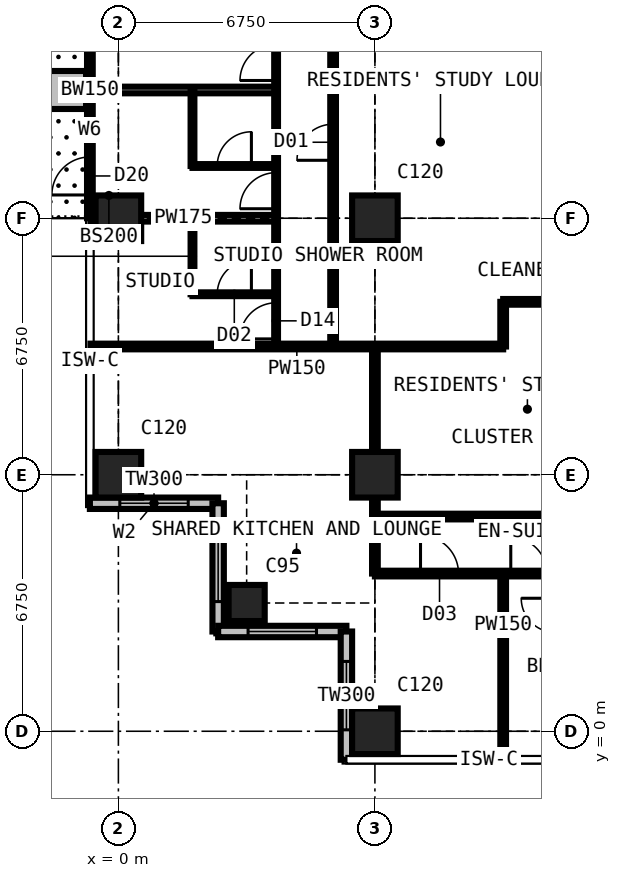
"""IFC4 building model, lengths in metres.
Left out: names, types, materials, properties, quantities, classifications, styles, units other than length and angle.
Written with IfcOpenShell. Run it as: python <this file> out.ifc"""

import sys

from ifc_helpers import new_model, si_unit, direction, frame, frame_2d, origin, origin_2d, place, context, subcontext, project, spatial, rectangle, extrude, element, fill, save


model = new_model("IFC4")
c1 = context("Model", 3, precision=1e-05, world=origin(), true_north=direction((0.0, 1.0)))
c2 = subcontext(c1, "Body", "Model", "MODEL_VIEW")
j1 = project(units=[si_unit("LENGTHUNIT", "METRE"), si_unit("PLANEANGLEUNIT", "RADIAN")], contexts=[c1])
p1 = place(None, origin())
s1 = spatial("IfcSite", under=j1, at=p1, CompositionType="ELEMENT")
p2 = place(p1, origin())
s2 = spatial("IfcBuilding", under=s1, at=p2, CompositionType="ELEMENT")
p3 = place(p2, frame((0.0, 0.0, 185.4)))
s3 = spatial("IfcBuildingStorey", under=s2, at=p3, CompositionType="ELEMENT", Elevation=185.4)
for number, where, z_axis, x_axis in (
    (1, (0.0, 6.75, 0.0), (0.0, 0.0, 1.0), (1.0, 0.0, 0.0)),
    (2, (0.0, 13.5, 0.0), (0.0, 0.0, 1.0), (1.0, 0.0, 0.0)),
):
    element("IfcColumn", number, at=place(p3, frame(where, z_axis=z_axis, x_axis=x_axis)), inside=s3, PredefinedType="COLUMN", context=c2, shape_type="SweptSolid", body=[
        extrude(rectangle(XDim=1.2, YDim=1.2, at=origin_2d()), origin(), (0.0, 0.0, 1.0), 3.6),
    ])
p4 = place(p3, frame((3.375, 3.375, 0.0), z_axis=(0.0, 0.0, 1.0), x_axis=(1.0, 0.0, 0.0)))
e3 = element("IfcColumn", 3, at=p4, inside=s3, PredefinedType="COLUMN", context=c2, shape_type="SweptSolid", body=[
    extrude(rectangle(XDim=0.95, YDim=0.95, at=origin_2d()), origin(), (0.0, 0.0, 1.0), 3.6),
])
for number, where, z_axis, x_axis in (
    (4, (6.75, 0.0, 0.0), (0.0, 0.0, 1.0), (1.0, 0.0, 0.0)),
    (5, (6.75, 6.75, 0.0), (0.0, 0.0, 1.0), (1.0, 0.0, 0.0)),
    (6, (6.75, 13.5, 0.0), (0.0, 0.0, 1.0), (1.0, 0.0, 0.0)),
):
    element("IfcColumn", number, at=place(p3, frame(where, z_axis=z_axis, x_axis=x_axis)), inside=s3, PredefinedType="COLUMN", context=c2, shape_type="SweptSolid", body=[
        extrude(rectangle(XDim=1.2, YDim=1.2, at=origin_2d()), origin(), (0.0, 0.0, 1.0), 3.6),
    ])
p5 = place(p3, frame((-0.75, 13.5, 0.0), z_axis=(0.0, 0.0, 1.0), x_axis=(0.0, 1.0, 0.0)))
e7 = element("IfcWall", 7, at=p5, inside=s3, PredefinedType="SOLIDWALL", context=c2, shape_type="SweptSolid", body=[
    extrude(rectangle(XDim=6.75, YDim=0.15, at=frame_2d((3.375, 0.0))), origin(), (0.0, 0.0, 1.0), 3.375),
])
p6 = place(p5, frame((0.613, 0.0, 0.0)))
e8 = element("IfcOpeningElement", 8, at=p6, cuts=e7, PredefinedType="OPENING", context=c2, shape_type="SweptSolid", body=[
    extrude(rectangle(XDim=1.0, YDim=2.2, at=frame_2d((0.5, 1.1))), frame((0.0, 0.085, 0.0), z_axis=(0.0, -1.0, 0.0), x_axis=(1.0, 0.0, 0.0)), (0.0, 0.0, 1.0), 0.17),
])
p7 = place(p5, frame((1.725, 0.0, 0.9)))
e9 = element("IfcOpeningElement", 9, at=p7, cuts=e7, PredefinedType="OPENING", context=c2, shape_type="SweptSolid", body=[
    extrude(rectangle(XDim=1.2, YDim=1.8, at=frame_2d((0.6, 0.9))), frame((0.0, 0.085, 0.0), z_axis=(0.0, -1.0, 0.0), x_axis=(1.0, 0.0, 0.0)), (0.0, 0.0, 1.0), 0.17),
])
p8 = place(p5, frame((5.137, 0.0, 0.0)))
e10 = element("IfcOpeningElement", 10, at=p8, cuts=e7, PredefinedType="OPENING", context=c2, shape_type="SweptSolid", body=[
    extrude(rectangle(XDim=1.0, YDim=2.2, at=frame_2d((0.5, 1.1))), frame((0.0, 0.085, 0.0), z_axis=(0.0, -1.0, 0.0), x_axis=(1.0, 0.0, 0.0)), (0.0, 0.0, 1.0), 0.17),
])
p9 = place(p5, frame((3.825, 0.0, 0.9)))
e11 = element("IfcOpeningElement", 11, at=p9, cuts=e7, PredefinedType="OPENING", context=c2, shape_type="SweptSolid", body=[
    extrude(rectangle(XDim=1.2, YDim=1.8, at=frame_2d((0.6, 0.9))), frame((0.0, 0.085, 0.0), z_axis=(0.0, -1.0, 0.0), x_axis=(1.0, 0.0, 0.0)), (0.0, 0.0, 1.0), 0.17),
])
p10 = place(p3, frame((-0.75, 6.0, 0.0), z_axis=(0.0, 0.0, 1.0), x_axis=(1.0, 0.0, 0.0)))
e12 = element("IfcWall", 12, at=p10, inside=s3, PredefinedType="SOLIDWALL", context=c2, shape_type="SweptSolid", body=[
    extrude(rectangle(XDim=3.375, YDim=0.3, at=frame_2d((1.688, 0.0))), origin(), (0.0, 0.0, 1.0), 3.375),
])
p11 = place(p10, frame((0.788, 0.0, 0.6)))
e13 = element("IfcOpeningElement", 13, at=p11, cuts=e12, PredefinedType="OPENING", context=c2, shape_type="SweptSolid", body=[
    extrude(rectangle(XDim=1.8, YDim=2.1, at=frame_2d((0.9, 1.05))), frame((0.0, 0.16, 0.0), z_axis=(0.0, -1.0, 0.0), x_axis=(1.0, 0.0, 0.0)), (0.0, 0.0, 1.0), 0.32),
])
p12 = place(p3, frame((2.625, 6.0, 0.0), z_axis=(0.0, 0.0, 1.0), x_axis=(0.0, -1.0, 0.0)))
e14 = element("IfcWall", 14, at=p12, inside=s3, PredefinedType="SOLIDWALL", context=c2, shape_type="SweptSolid", body=[
    extrude(rectangle(XDim=3.375, YDim=0.3, at=frame_2d((1.688, 0.0))), origin(), (0.0, 0.0, 1.0), 3.375),
])
p13 = place(p12, frame((0.788, 0.0, 0.6)))
e15 = element("IfcOpeningElement", 15, at=p13, cuts=e14, PredefinedType="OPENING", context=c2, shape_type="SweptSolid", body=[
    extrude(rectangle(XDim=1.8, YDim=2.1, at=frame_2d((0.9, 1.05))), frame((0.0, 0.16, 0.0), z_axis=(0.0, -1.0, 0.0), x_axis=(1.0, 0.0, 0.0)), (0.0, 0.0, 1.0), 0.32),
])
p14 = place(p3, frame((2.625, 2.625, 0.0), z_axis=(0.0, 0.0, 1.0), x_axis=(1.0, 0.0, 0.0)))
e16 = element("IfcWall", 16, at=p14, inside=s3, PredefinedType="SOLIDWALL", context=c2, shape_type="SweptSolid", body=[
    extrude(rectangle(XDim=3.375, YDim=0.3, at=frame_2d((1.688, 0.0))), origin(), (0.0, 0.0, 1.0), 3.375),
])
p15 = place(p14, frame((0.788, 0.0, 0.6)))
e17 = element("IfcOpeningElement", 17, at=p15, cuts=e16, PredefinedType="OPENING", context=c2, shape_type="SweptSolid", body=[
    extrude(rectangle(XDim=1.8, YDim=2.1, at=frame_2d((0.9, 1.05))), frame((0.0, 0.16, 0.0), z_axis=(0.0, -1.0, 0.0), x_axis=(1.0, 0.0, 0.0)), (0.0, 0.0, 1.0), 0.32),
])
p16 = place(p3, frame((6.0, 2.625, 0.0), z_axis=(0.0, 0.0, 1.0), x_axis=(0.0, -1.0, 0.0)))
e18 = element("IfcWall", 18, at=p16, inside=s3, PredefinedType="SOLIDWALL", context=c2, shape_type="SweptSolid", body=[
    extrude(rectangle(XDim=3.375, YDim=0.3, at=frame_2d((1.688, 0.0))), origin(), (0.0, 0.0, 1.0), 3.375),
])
p17 = place(p16, frame((0.788, 0.0, 0.6)))
e19 = element("IfcOpeningElement", 19, at=p17, cuts=e18, PredefinedType="OPENING", context=c2, shape_type="SweptSolid", body=[
    extrude(rectangle(XDim=1.8, YDim=2.1, at=frame_2d((0.9, 1.05))), frame((0.0, 0.16, 0.0), z_axis=(0.0, -1.0, 0.0), x_axis=(1.0, 0.0, 0.0)), (0.0, 0.0, 1.0), 0.32),
])
p18 = place(p3, frame((-0.85, 16.875, 0.0), z_axis=(0.0, 0.0, 1.0), x_axis=(-1.0, 0.0, 0.0)))
e20 = element("IfcWall", 20, at=p18, inside=s3, PredefinedType="USERDEFINED", context=c2, shape_type="SweptSolid", body=[
    extrude(rectangle(XDim=2.2, YDim=1.0, at=frame_2d((1.1, 0.0))), origin(), (0.0, 0.0, 1.0), 0.9),
])
p19 = place(p3, frame((-0.734, 10.125, 0.0), z_axis=(0.0, 0.0, 1.0), x_axis=(1.0, 0.0, 0.0)))
e21 = element("IfcWall", 21, at=p19, inside=s3, PredefinedType="PARTITIONING", context=c2, shape_type="SweptSolid", body=[
    extrude(rectangle(XDim=10.859, YDim=0.15, at=frame_2d((5.429, 0.0))), origin(), (0.0, 0.0, 1.0), 3.375),
])
p20 = place(p3, frame((-0.734, 13.5, 0.0), z_axis=(0.0, 0.0, 1.0), x_axis=(1.0, 0.0, 0.0)))
e22 = element("IfcWall", 22, at=p20, inside=s3, PredefinedType="PARTITIONING", context=c2, shape_type="SweptSolid", body=[
    extrude(rectangle(XDim=4.884, YDim=0.175, at=frame_2d((2.442, 0.0))), origin(), (0.0, 0.0, 1.0), 2.877),
])
p21 = place(p3, frame((-0.734, 16.875, 0.0), z_axis=(0.0, 0.0, 1.0), x_axis=(1.0, 0.0, 0.0)))
e23 = element("IfcWall", 23, at=p21, inside=s3, PredefinedType="PARTITIONING", context=c2, shape_type="SweptSolid", body=[
    extrude(rectangle(XDim=4.884, YDim=0.175, at=frame_2d((2.442, 0.0))), origin(), (0.0, 0.0, 1.0), 3.375),
])
p22 = place(p3, frame((1.95, 11.5, 0.0), z_axis=(0.0, 0.0, 1.0), x_axis=(0.0, 1.0, 0.0)))
e24 = element("IfcWall", 24, at=p22, inside=s3, PredefinedType="PARTITIONING", context=c2, shape_type="SweptSolid", body=[
    extrude(rectangle(XDim=2.0, YDim=0.1, at=frame_2d((1.0, 0.0))), origin(), (0.0, 0.0, 1.0), 3.375),
])
p23 = place(p3, frame((1.95, 11.5, 0.0), z_axis=(0.0, 0.0, 1.0), x_axis=(1.0, 0.0, 0.0)))
e25 = element("IfcWall", 25, at=p23, inside=s3, PredefinedType="PARTITIONING", context=c2, shape_type="SweptSolid", body=[
    extrude(rectangle(XDim=2.2, YDim=0.1, at=frame_2d((1.1, 0.0))), origin(), (0.0, 0.0, 1.0), 3.375),
])
p24 = place(p23, frame((0.65, 0.0, 0.0)))
e26 = element("IfcOpeningElement", 26, at=p24, cuts=e25, PredefinedType="OPENING", context=c2, shape_type="SweptSolid", body=[
    extrude(rectangle(XDim=0.9, YDim=2.2, at=frame_2d((0.45, 1.1))), frame((0.0, 0.06, 0.0), z_axis=(0.0, -1.0, 0.0), x_axis=(1.0, 0.0, 0.0)), (0.0, 0.0, 1.0), 0.12),
])
p25 = place(p3, frame((1.95, 14.875, 0.0), z_axis=(0.0, 0.0, 1.0), x_axis=(0.0, 1.0, 0.0)))
e27 = element("IfcWall", 27, at=p25, inside=s3, PredefinedType="PARTITIONING", context=c2, shape_type="SweptSolid", body=[
    extrude(rectangle(XDim=2.0, YDim=0.1, at=frame_2d((1.0, 0.0))), origin(), (0.0, 0.0, 1.0), 3.375),
])
p26 = place(p3, frame((1.95, 14.875, 0.0), z_axis=(0.0, 0.0, 1.0), x_axis=(1.0, 0.0, 0.0)))
e28 = element("IfcWall", 28, at=p26, inside=s3, PredefinedType="PARTITIONING", context=c2, shape_type="SweptSolid", body=[
    extrude(rectangle(XDim=2.2, YDim=0.1, at=frame_2d((1.1, 0.0))), origin(), (0.0, 0.0, 1.0), 3.375),
])
p27 = place(p26, frame((0.65, 0.0, 0.0)))
e29 = element("IfcOpeningElement", 29, at=p27, cuts=e28, PredefinedType="OPENING", context=c2, shape_type="SweptSolid", body=[
    extrude(rectangle(XDim=0.9, YDim=2.2, at=frame_2d((0.45, 1.1))), frame((0.0, 0.06, 0.0), z_axis=(0.0, -1.0, 0.0), x_axis=(1.0, 0.0, 0.0)), (0.0, 0.0, 1.0), 0.12),
])
p28 = place(p3, frame((4.15, 10.125, 0.0), z_axis=(0.0, 0.0, 1.0), x_axis=(0.0, 1.0, 0.0)))
e30 = element("IfcWall", 30, at=p28, inside=s3, PredefinedType="PARTITIONING", context=c2, shape_type="SweptSolid", body=[
    extrude(rectangle(XDim=16.875, YDim=0.1, at=frame_2d((8.438, 0.0))), origin(), (0.0, 0.0, 1.0), 3.375),
])
p29 = place(p28, frame((0.2, 0.0, 0.0)))
e31 = element("IfcOpeningElement", 31, at=p29, cuts=e30, PredefinedType="OPENING", context=c2, shape_type="SweptSolid", body=[
    extrude(rectangle(XDim=0.95, YDim=2.2, at=frame_2d((0.475, 1.1))), frame((0.0, 0.06, 0.0), z_axis=(0.0, -1.0, 0.0), x_axis=(1.0, 0.0, 0.0)), (0.0, 0.0, 1.0), 0.12),
])
p30 = place(p28, frame((3.625, 0.0, 0.0)))
e32 = element("IfcOpeningElement", 32, at=p30, cuts=e30, PredefinedType="OPENING", context=c2, shape_type="SweptSolid", body=[
    extrude(rectangle(XDim=0.95, YDim=2.2, at=frame_2d((0.475, 1.1))), frame((0.0, 0.06, 0.0), z_axis=(0.0, -1.0, 0.0), x_axis=(1.0, 0.0, 0.0)), (0.0, 0.0, 1.0), 0.12),
])
p31 = place(p28, frame((7.0, 0.0, 0.0)))
e33 = element("IfcOpeningElement", 33, at=p31, cuts=e30, PredefinedType="OPENING", context=c2, shape_type="SweptSolid", body=[
    extrude(rectangle(XDim=0.95, YDim=2.2, at=frame_2d((0.475, 1.1))), frame((0.0, 0.06, 0.0), z_axis=(0.0, -1.0, 0.0), x_axis=(1.0, 0.0, 0.0)), (0.0, 0.0, 1.0), 0.12),
])
p32 = place(p28, frame((10.375, 0.0, 0.0)))
e34 = element("IfcOpeningElement", 34, at=p32, cuts=e30, PredefinedType="OPENING", context=c2, shape_type="SweptSolid", body=[
    extrude(rectangle(XDim=0.95, YDim=2.2, at=frame_2d((0.475, 1.1))), frame((0.0, 0.06, 0.0), z_axis=(0.0, -1.0, 0.0), x_axis=(1.0, 0.0, 0.0)), (0.0, 0.0, 1.0), 0.12),
])
p33 = place(p3, frame((5.65, 10.125, 0.0), z_axis=(0.0, 0.0, 1.0), x_axis=(0.0, 1.0, 0.0)))
e35 = element("IfcWall", 35, at=p33, inside=s3, PredefinedType="PARTITIONING", context=c2, shape_type="SweptSolid", body=[
    extrude(rectangle(XDim=10.762, YDim=0.15, at=frame_2d((5.381, 0.0))), origin(), (0.0, 0.0, 1.0), 3.375),
])
p34 = place(p33, frame((4.9, 0.0, 0.0)))
e36 = element("IfcOpeningElement", 36, at=p34, cuts=e35, PredefinedType="OPENING", context=c2, shape_type="SweptSolid", body=[
    extrude(rectangle(XDim=0.95, YDim=2.2, at=frame_2d((0.475, 1.1))), frame((0.0, 0.085, 0.0), z_axis=(0.0, -1.0, 0.0), x_axis=(1.0, 0.0, 0.0)), (0.0, 0.0, 1.0), 0.17),
])
p35 = place(p3, frame((6.75, 4.15, 0.0), z_axis=(0.0, 0.0, 1.0), x_axis=(0.0, 1.0, 0.0)))
e37 = element("IfcWall", 37, at=p35, inside=s3, PredefinedType="PARTITIONING", context=c2, shape_type="SweptSolid", body=[
    extrude(rectangle(XDim=5.975, YDim=0.15, at=frame_2d((2.988, 0.0))), origin(), (0.0, 0.0, 1.0), 2.877),
])
p36 = place(p3, frame((6.75, 4.15, 0.0), z_axis=(0.0, 0.0, 1.0), x_axis=(1.0, 0.0, 0.0)))
e38 = element("IfcWall", 38, at=p36, inside=s3, PredefinedType="PARTITIONING", context=c2, shape_type="SweptSolid", body=[
    extrude(rectangle(XDim=20.25, YDim=0.15, at=frame_2d((10.125, 0.0))), origin(), (0.0, 0.0, 1.0), 3.375),
])
p37 = place(p36, frame((1.2, 0.0, 0.0)))
e39 = element("IfcOpeningElement", 39, at=p37, cuts=e38, PredefinedType="OPENING", context=c2, shape_type="SweptSolid", body=[
    extrude(rectangle(XDim=1.0, YDim=2.2, at=frame_2d((0.5, 1.1))), frame((0.0, 0.085, 0.0), z_axis=(0.0, -1.0, 0.0), x_axis=(1.0, 0.0, 0.0)), (0.0, 0.0, 1.0), 0.17),
])
p38 = place(p36, frame((3.575, 0.0, 0.0)))
e40 = element("IfcOpeningElement", 40, at=p38, cuts=e38, PredefinedType="OPENING", context=c2, shape_type="SweptSolid", body=[
    extrude(rectangle(XDim=0.95, YDim=2.2, at=frame_2d((0.475, 1.1))), frame((0.0, 0.085, 0.0), z_axis=(0.0, -1.0, 0.0), x_axis=(1.0, 0.0, 0.0)), (0.0, 0.0, 1.0), 0.17),
])
p39 = place(p36, frame((7.0, 0.0, 0.0)))
e41 = element("IfcOpeningElement", 41, at=p39, cuts=e38, PredefinedType="OPENING", context=c2, shape_type="SweptSolid", body=[
    extrude(rectangle(XDim=0.95, YDim=2.2, at=frame_2d((0.475, 1.1))), frame((0.0, 0.085, 0.0), z_axis=(0.0, -1.0, 0.0), x_axis=(1.0, 0.0, 0.0)), (0.0, 0.0, 1.0), 0.17),
])
p40 = place(p36, frame((10.325, 0.0, 0.0)))
e42 = element("IfcOpeningElement", 42, at=p40, cuts=e38, PredefinedType="OPENING", context=c2, shape_type="SweptSolid", body=[
    extrude(rectangle(XDim=0.95, YDim=2.2, at=frame_2d((0.475, 1.1))), frame((0.0, 0.085, 0.0), z_axis=(0.0, -1.0, 0.0), x_axis=(1.0, 0.0, 0.0)), (0.0, 0.0, 1.0), 0.17),
])
p41 = place(p36, frame((13.75, 0.0, 0.0)))
e43 = element("IfcOpeningElement", 43, at=p41, cuts=e38, PredefinedType="OPENING", context=c2, shape_type="SweptSolid", body=[
    extrude(rectangle(XDim=0.95, YDim=2.2, at=frame_2d((0.475, 1.1))), frame((0.0, 0.085, 0.0), z_axis=(0.0, -1.0, 0.0), x_axis=(1.0, 0.0, 0.0)), (0.0, 0.0, 1.0), 0.17),
])
p42 = place(p36, frame((17.125, 0.0, 0.0)))
e44 = element("IfcOpeningElement", 44, at=p42, cuts=e38, PredefinedType="OPENING", context=c2, shape_type="SweptSolid", body=[
    extrude(rectangle(XDim=0.95, YDim=2.2, at=frame_2d((0.475, 1.1))), frame((0.0, 0.085, 0.0), z_axis=(0.0, -1.0, 0.0), x_axis=(1.0, 0.0, 0.0)), (0.0, 0.0, 1.0), 0.17),
])
p43 = place(p3, frame((6.75, 5.65, 0.0), z_axis=(0.0, 0.0, 1.0), x_axis=(1.0, 0.0, 0.0)))
e45 = element("IfcWall", 45, at=p43, inside=s3, PredefinedType="PARTITIONING", context=c2, shape_type="SweptSolid", body=[
    extrude(rectangle(XDim=8.025, YDim=0.15, at=frame_2d((4.012, 0.0))), origin(), (0.0, 0.0, 1.0), 3.375),
])
p44 = place(p3, frame((10.125, -0.734, 0.0), z_axis=(0.0, 0.0, 1.0), x_axis=(0.0, 1.0, 0.0)))
e46 = element("IfcWall", 46, at=p44, inside=s3, PredefinedType="PARTITIONING", context=c2, shape_type="SweptSolid", body=[
    extrude(rectangle(XDim=4.884, YDim=0.15, at=frame_2d((2.442, 0.0))), origin(), (0.0, 0.0, 1.0), 3.375),
])
p45 = place(p3, frame((10.125, 10.125, 0.0), z_axis=(0.0, 0.0, 1.0), x_axis=(0.0, 1.0, 0.0)))
e47 = element("IfcWall", 47, at=p45, inside=s3, PredefinedType="PARTITIONING", context=c2, shape_type="SweptSolid", body=[
    extrude(rectangle(XDim=1.175, YDim=0.15, at=frame_2d((0.587, 0.0))), origin(), (0.0, 0.0, 1.0), 3.375),
])
p46 = place(p3, frame((10.125, 11.3, 0.0), z_axis=(0.0, 0.0, 1.0), x_axis=(1.0, 0.0, 0.0)))
e48 = element("IfcWall", 48, at=p46, inside=s3, PredefinedType="PARTITIONING", context=c2, shape_type="SweptSolid", body=[
    extrude(rectangle(XDim=20.25, YDim=0.15, at=frame_2d((10.125, 0.0))), origin(), (0.0, 0.0, 1.0), 3.375),
])
p47 = place(p46, frame((5.2, 0.0, 0.0)))
e49 = element("IfcOpeningElement", 49, at=p47, cuts=e48, PredefinedType="OPENING", context=c2, shape_type="SweptSolid", body=[
    extrude(rectangle(XDim=1.0, YDim=2.2, at=frame_2d((0.5, 1.1))), frame((0.0, 0.085, 0.0), z_axis=(0.0, -1.0, 0.0), x_axis=(1.0, 0.0, 0.0)), (0.0, 0.0, 1.0), 0.17),
])
p48 = place(p46, frame((11.312, 0.0, 0.0)))
e50 = element("IfcOpeningElement", 50, at=p48, cuts=e48, PredefinedType="OPENING", context=c2, shape_type="SweptSolid", body=[
    extrude(rectangle(XDim=1.0, YDim=2.2, at=frame_2d((0.5, 1.1))), frame((0.0, 0.085, 0.0), z_axis=(0.0, -1.0, 0.0), x_axis=(1.0, 0.0, 0.0)), (0.0, 0.0, 1.0), 0.17),
])
p49 = place(p46, frame((3.325, 0.0, 0.0)))
e51 = element("IfcOpeningElement", 51, at=p49, cuts=e48, PredefinedType="OPENING", context=c2, shape_type="SweptSolid", body=[
    extrude(rectangle(XDim=0.95, YDim=2.2, at=frame_2d((0.475, 1.1))), frame((0.0, 0.085, 0.0), z_axis=(0.0, -1.0, 0.0), x_axis=(1.0, 0.0, 0.0)), (0.0, 0.0, 1.0), 0.17),
])
p50 = place(p6, origin())
e52 = element("IfcDoor", 52, at=p50, inside=s3, OperationType="SINGLE_SWING_LEFT", PredefinedType="DOOR", context=c2, shape_type="SweptSolid", body=[
    extrude(rectangle(XDim=1.0, YDim=2.2, at=frame_2d((0.5, 1.1))), frame((0.0, 0.025, 0.0), z_axis=(0.0, -1.0, 0.0), x_axis=(1.0, 0.0, 0.0)), (0.0, 0.0, 1.0), 0.05),
])
fill(e8, e52)
p51 = place(p7, origin())
e53 = element("IfcWindow", 53, at=p51, inside=s3, PartitioningType="SINGLE_PANEL", PredefinedType="WINDOW", context=c2, shape_type="SweptSolid", body=[
    extrude(rectangle(XDim=1.2, YDim=1.8, at=frame_2d((0.6, 0.9))), frame((0.0, 0.03, 0.0), z_axis=(0.0, -1.0, 0.0), x_axis=(1.0, 0.0, 0.0)), (0.0, 0.0, 1.0), 0.06),
])
fill(e9, e53)
p52 = place(p9, origin())
e54 = element("IfcWindow", 54, at=p52, inside=s3, PartitioningType="SINGLE_PANEL", PredefinedType="WINDOW", context=c2, shape_type="SweptSolid", body=[
    extrude(rectangle(XDim=1.2, YDim=1.8, at=frame_2d((0.6, 0.9))), frame((0.0, 0.03, 0.0), z_axis=(0.0, -1.0, 0.0), x_axis=(1.0, 0.0, 0.0)), (0.0, 0.0, 1.0), 0.06),
])
fill(e11, e54)
p53 = place(p11, origin())
e55 = element("IfcWindow", 55, at=p53, inside=s3, PartitioningType="SINGLE_PANEL", PredefinedType="WINDOW", context=c2, shape_type="SweptSolid", body=[
    extrude(rectangle(XDim=1.8, YDim=2.1, at=frame_2d((0.9, 1.05))), frame((0.0, 0.03, 0.0), z_axis=(0.0, -1.0, 0.0), x_axis=(1.0, 0.0, 0.0)), (0.0, 0.0, 1.0), 0.06),
])
fill(e13, e55)
p54 = place(p13, origin())
e56 = element("IfcWindow", 56, at=p54, inside=s3, PartitioningType="SINGLE_PANEL", PredefinedType="WINDOW", context=c2, shape_type="SweptSolid", body=[
    extrude(rectangle(XDim=1.8, YDim=2.1, at=frame_2d((0.9, 1.05))), frame((0.0, 0.03, 0.0), z_axis=(0.0, -1.0, 0.0), x_axis=(1.0, 0.0, 0.0)), (0.0, 0.0, 1.0), 0.06),
])
fill(e15, e56)
p55 = place(p15, origin())
e57 = element("IfcWindow", 57, at=p55, inside=s3, PartitioningType="SINGLE_PANEL", PredefinedType="WINDOW", context=c2, shape_type="SweptSolid", body=[
    extrude(rectangle(XDim=1.8, YDim=2.1, at=frame_2d((0.9, 1.05))), frame((0.0, 0.03, 0.0), z_axis=(0.0, -1.0, 0.0), x_axis=(1.0, 0.0, 0.0)), (0.0, 0.0, 1.0), 0.06),
])
fill(e17, e57)
p56 = place(p17, origin())
e58 = element("IfcWindow", 58, at=p56, inside=s3, PartitioningType="SINGLE_PANEL", PredefinedType="WINDOW", context=c2, shape_type="SweptSolid", body=[
    extrude(rectangle(XDim=1.8, YDim=2.1, at=frame_2d((0.9, 1.05))), frame((0.0, 0.03, 0.0), z_axis=(0.0, -1.0, 0.0), x_axis=(1.0, 0.0, 0.0)), (0.0, 0.0, 1.0), 0.06),
])
fill(e19, e58)
p57 = place(p37, origin())
e59 = element("IfcDoor", 59, at=p57, inside=s3, OperationType="SINGLE_SWING_LEFT", PredefinedType="DOOR", context=c2, shape_type="SweptSolid", body=[
    extrude(rectangle(XDim=1.0, YDim=2.2, at=frame_2d((0.5, 1.1))), frame((0.0, 0.025, 0.0), z_axis=(0.0, -1.0, 0.0), x_axis=(1.0, 0.0, 0.0)), (0.0, 0.0, 1.0), 0.05),
])
fill(e39, e59)
p58 = place(p38, origin())
e60 = element("IfcDoor", 60, at=p58, inside=s3, OperationType="SINGLE_SWING_LEFT", PredefinedType="DOOR", context=c2, shape_type="SweptSolid", body=[
    extrude(rectangle(XDim=0.95, YDim=2.2, at=frame_2d((0.475, 1.1))), frame((0.0, 0.025, 0.0), z_axis=(0.0, -1.0, 0.0), x_axis=(1.0, 0.0, 0.0)), (0.0, 0.0, 1.0), 0.05),
])
fill(e40, e60)
p59 = place(p29, origin())
e61 = element("IfcDoor", 61, at=p59, inside=s3, OperationType="SINGLE_SWING_LEFT", PredefinedType="DOOR", context=c2, shape_type="SweptSolid", body=[
    extrude(rectangle(XDim=0.95, YDim=2.2, at=frame_2d((0.475, 1.1))), frame((0.0, 0.025, 0.0), z_axis=(0.0, -1.0, 0.0), x_axis=(1.0, 0.0, 0.0)), (0.0, 0.0, 1.0), 0.05),
])
fill(e31, e61)
p60 = place(p24, origin())
e62 = element("IfcDoor", 62, at=p60, inside=s3, OperationType="SINGLE_SWING_RIGHT", PredefinedType="DOOR", context=c2, shape_type="SweptSolid", body=[
    extrude(rectangle(XDim=0.9, YDim=2.2, at=frame_2d((0.45, 1.1))), frame((0.0, 0.025, 0.0), z_axis=(0.0, -1.0, 0.0), x_axis=(1.0, 0.0, 0.0)), (0.0, 0.0, 1.0), 0.05),
])
fill(e26, e62)
p61 = place(p30, origin())
e63 = element("IfcDoor", 63, at=p61, inside=s3, OperationType="SINGLE_SWING_LEFT", PredefinedType="DOOR", context=c2, shape_type="SweptSolid", body=[
    extrude(rectangle(XDim=0.95, YDim=2.2, at=frame_2d((0.475, 1.1))), frame((0.0, 0.025, 0.0), z_axis=(0.0, -1.0, 0.0), x_axis=(1.0, 0.0, 0.0)), (0.0, 0.0, 1.0), 0.05),
])
fill(e32, e63)
p62 = place(p27, origin())
e64 = element("IfcDoor", 64, at=p62, inside=s3, OperationType="SINGLE_SWING_RIGHT", PredefinedType="DOOR", context=c2, shape_type="SweptSolid", body=[
    extrude(rectangle(XDim=0.9, YDim=2.2, at=frame_2d((0.45, 1.1))), frame((0.0, 0.025, 0.0), z_axis=(0.0, -1.0, 0.0), x_axis=(1.0, 0.0, 0.0)), (0.0, 0.0, 1.0), 0.05),
])
fill(e29, e64)
p63 = place(p31, origin())
e65 = element("IfcDoor", 65, at=p63, inside=s3, OperationType="SINGLE_SWING_LEFT", PredefinedType="DOOR", context=c2, shape_type="SweptSolid", body=[
    extrude(rectangle(XDim=0.95, YDim=2.2, at=frame_2d((0.475, 1.1))), frame((0.0, 0.025, 0.0), z_axis=(0.0, -1.0, 0.0), x_axis=(1.0, 0.0, 0.0)), (0.0, 0.0, 1.0), 0.05),
])
fill(e33, e65)
p64 = place(p34, origin())
e66 = element("IfcDoor", 66, at=p64, inside=s3, OperationType="SINGLE_SWING_LEFT", PredefinedType="DOOR", context=c2, shape_type="SweptSolid", body=[
    extrude(rectangle(XDim=0.95, YDim=2.2, at=frame_2d((0.475, 1.1))), frame((0.0, 0.025, 0.0), z_axis=(0.0, -1.0, 0.0), x_axis=(1.0, 0.0, 0.0)), (0.0, 0.0, 1.0), 0.05),
])
fill(e36, e66)
save(model, sys.argv[1])
